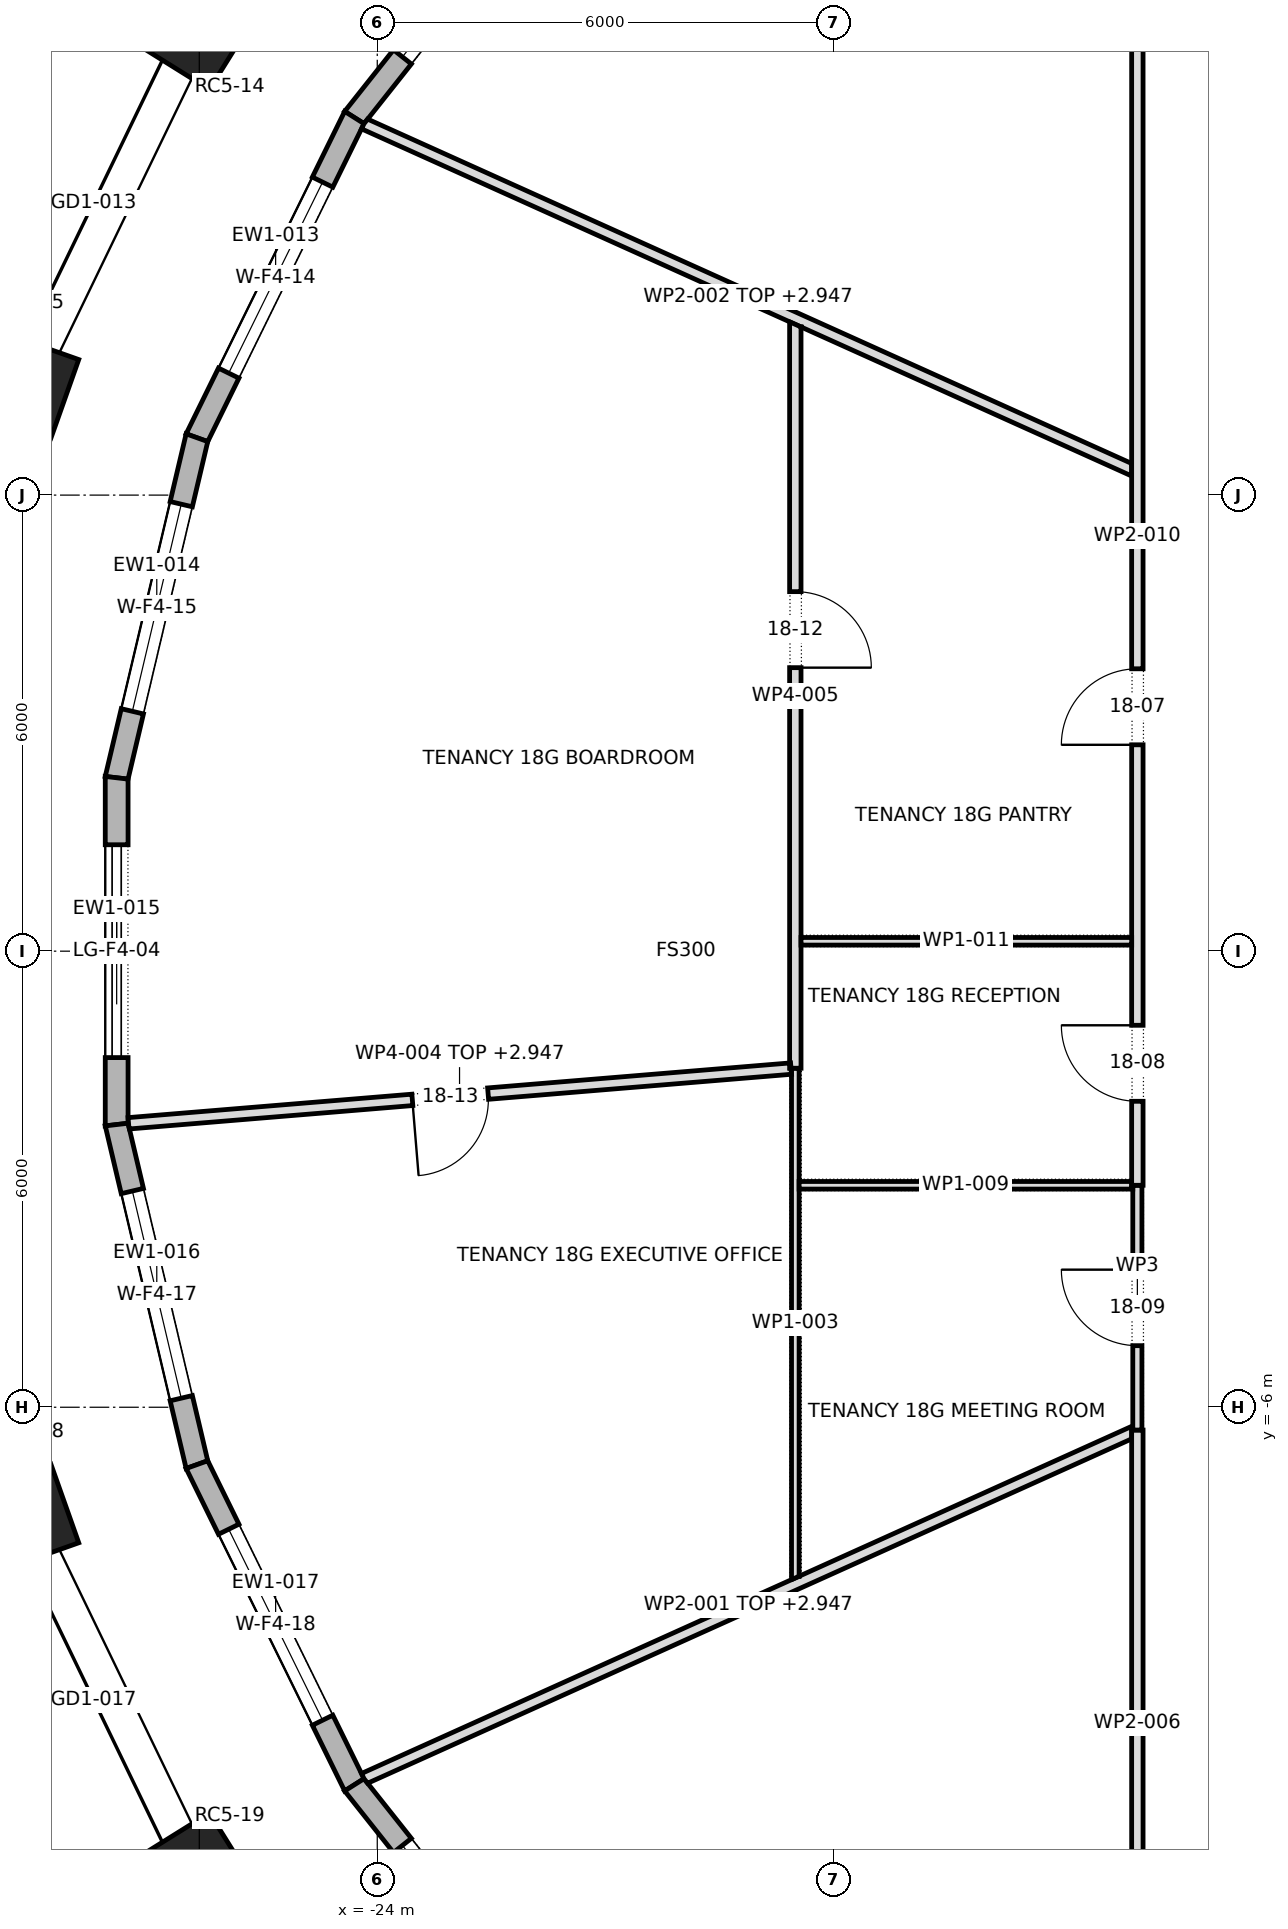
"""IFC4 building model, lengths in metres.
Left out: names, types, materials, properties, quantities, classifications, styles, units other than length and angle.
Written with IfcOpenShell. Run it as: python <this file> out.ifc"""

import sys

from ifc_helpers import new_model, si_unit, direction, frame, frame_2d, origin, origin_2d, place, context, subcontext, project, spatial, polyline, rectangle, outline, extrude, element, fill, save


model = new_model("IFC4")
c1 = context("Model", 3, precision=1e-05, world=origin(), true_north=direction((0.0, 1.0)))
c2 = subcontext(c1, "Body", "Model", "MODEL_VIEW")
j1 = project(units=[si_unit("LENGTHUNIT", "METRE"), si_unit("PLANEANGLEUNIT", "RADIAN")], contexts=[c1])
p1 = place(None, origin())
s1 = spatial("IfcSite", under=j1, at=p1, CompositionType="ELEMENT")
p2 = place(p1, origin())
s2 = spatial("IfcBuilding", under=s1, at=p2, CompositionType="ELEMENT")
p3 = place(p2, frame((0.0, 0.0, 264.3)))
s3 = spatial("IfcBuildingStorey", under=s2, at=p3, CompositionType="ELEMENT", Elevation=264.3)
for number, where, z_axis, x_axis in (
    (1, (-26.342, 12.069, 0.0), (0.0, 0.0, 1.0), (-0.529, -0.849, 0.0)),
    (2, (-28.582, 7.432, 0.0), (0.0, 0.0, 1.0), (-0.334, -0.943, 0.0)),
    (3, (-28.582, -7.432, 0.0), (0.0, 0.0, 1.0), (0.334, -0.943, 0.0)),
    (4, (-26.342, -12.069, 0.0), (0.0, 0.0, 1.0), (0.529, -0.849, 0.0)),
):
    element("IfcColumn", number, at=place(p3, frame(where, z_axis=z_axis, x_axis=x_axis)), inside=s3, PredefinedType="COLUMN", context=c2, shape_type="SweptSolid", body=[
        extrude(rectangle(XDim=1.1, YDim=1.0, at=origin_2d()), origin(), (0.0, 0.0, 1.0), 4.0),
    ])
p4 = place(p3, frame((-21.297, 14.756, 0.0), z_axis=(0.0, 0.0, 1.0), x_axis=(-0.621358373565, -0.783526497063, 0.0)))
e5 = element("IfcWall", 5, at=p4, inside=s3, PredefinedType="STANDARD", context=c2, shape_type="SweptSolid", body=[
    extrude(outline(polyline([(-0.015, -0.15), (4.852, -0.15), (4.82, 0.15), (0.015, 0.15), (-0.015, -0.15)])), origin(), (0.0, 0.0, 1.0), 3.7),
])
p5 = place(p4, frame((1.018, 0.0, 0.6)))
e6 = element("IfcOpeningElement", 6, at=p5, cuts=e5, PredefinedType="OPENING", context=c2, shape_type="SweptSolid", body=[
    extrude(rectangle(XDim=2.8, YDim=2.65, at=frame_2d((1.4, 1.325))), frame((0.0, 0.162, 0.0), z_axis=(0.0, -1.0, 0.0), x_axis=(1.0, 0.0, 0.0)), (0.0, 0.0, 1.0), 0.324),
])
p6 = place(p3, frame((-24.302, 10.967, 0.0), z_axis=(0.0, 0.0, 1.0), x_axis=(-0.441169971308, -0.89742356578, 0.0)))
e7 = element("IfcWall", 7, at=p6, inside=s3, PredefinedType="STANDARD", context=c2, shape_type="SweptSolid", body=[
    extrude(outline(polyline([(-0.016, -0.15), (4.711, -0.15), (4.677, 0.15), (0.016, 0.15), (-0.016, -0.15)])), origin(), (0.0, 0.0, 1.0), 3.7),
])
p7 = place(p6, frame((0.947, 0.0, 0.6)))
e8 = element("IfcOpeningElement", 8, at=p7, cuts=e7, PredefinedType="OPENING", context=c2, shape_type="SweptSolid", body=[
    extrude(rectangle(XDim=2.8, YDim=2.65, at=frame_2d((1.4, 1.325))), frame((0.0, 0.162, 0.0), z_axis=(0.0, -1.0, 0.0), x_axis=(1.0, 0.0, 0.0)), (0.0, 0.0, 1.0), 0.324),
])
p8 = place(p3, frame((-26.372, 6.755, 0.0), z_axis=(0.0, 0.0, 1.0), x_axis=(-0.229767529411, -0.973245540667, 0.0)))
e9 = element("IfcWall", 9, at=p8, inside=s3, PredefinedType="STANDARD", context=c2, shape_type="SweptSolid", body=[
    extrude(outline(polyline([(-0.017, -0.15), (4.614, -0.15), (4.579, 0.15), (0.017, 0.15), (-0.017, -0.15)])), origin(), (0.0, 0.0, 1.0), 3.7),
])
p9 = place(p8, frame((0.898, 0.0, 0.6)))
e10 = element("IfcOpeningElement", 10, at=p9, cuts=e9, PredefinedType="OPENING", context=c2, shape_type="SweptSolid", body=[
    extrude(rectangle(XDim=2.8, YDim=2.65, at=frame_2d((1.4, 1.325))), frame((0.0, 0.162, 0.0), z_axis=(0.0, -1.0, 0.0), x_axis=(1.0, 0.0, 0.0)), (0.0, 0.0, 1.0), 0.324),
])
p10 = place(p3, frame((-27.428, 2.281, 0.0), z_axis=(0.0, 0.0, 1.0), x_axis=(0.0, -1.0, 0.0)))
e11 = element("IfcWall", 11, at=p10, inside=s3, PredefinedType="STANDARD", context=c2, shape_type="SweptSolid", body=[
    extrude(outline(polyline([(-0.018, -0.15), (4.58, -0.15), (4.545, 0.15), (0.018, 0.15), (-0.018, -0.15)])), origin(), (0.0, 0.0, 1.0), 3.7),
])
p11 = place(p10, frame((0.881, 0.0, 0.0)))
e12 = element("IfcOpeningElement", 12, at=p11, cuts=e11, PredefinedType="OPENING", context=c2, shape_type="SweptSolid", body=[
    extrude(rectangle(XDim=2.8, YDim=3.25, at=frame_2d((1.4, 1.625))), frame((0.0, 0.162, 0.0), z_axis=(0.0, -1.0, 0.0), x_axis=(1.0, 0.0, 0.0)), (0.0, 0.0, 1.0), 0.324),
])
p12 = place(p3, frame((-27.428, -2.281, 0.0), z_axis=(0.0, 0.0, 1.0), x_axis=(0.229767529411, -0.973245540667, 0.0)))
e13 = element("IfcWall", 13, at=p12, inside=s3, PredefinedType="STANDARD", context=c2, shape_type="SweptSolid", body=[
    extrude(outline(polyline([(-0.018, -0.15), (4.614, -0.15), (4.58, 0.15), (0.018, 0.15), (-0.018, -0.15)])), origin(), (0.0, 0.0, 1.0), 3.7),
])
p13 = place(p12, frame((0.898, 0.0, 0.6)))
e14 = element("IfcOpeningElement", 14, at=p13, cuts=e13, PredefinedType="OPENING", context=c2, shape_type="SweptSolid", body=[
    extrude(rectangle(XDim=2.8, YDim=2.65, at=frame_2d((1.4, 1.325))), frame((0.0, 0.162, 0.0), z_axis=(0.0, -1.0, 0.0), x_axis=(1.0, 0.0, 0.0)), (0.0, 0.0, 1.0), 0.324),
])
p14 = place(p3, frame((-26.372, -6.755, 0.0), z_axis=(0.0, 0.0, 1.0), x_axis=(0.441169971308, -0.89742356578, 0.0)))
e15 = element("IfcWall", 15, at=p14, inside=s3, PredefinedType="STANDARD", context=c2, shape_type="SweptSolid", body=[
    extrude(outline(polyline([(-0.017, -0.15), (4.71, -0.15), (4.678, 0.15), (0.017, 0.15), (-0.017, -0.15)])), origin(), (0.0, 0.0, 1.0), 3.7),
])
p15 = place(p14, frame((0.947, 0.0, 0.6)))
e16 = element("IfcOpeningElement", 16, at=p15, cuts=e15, PredefinedType="OPENING", context=c2, shape_type="SweptSolid", body=[
    extrude(rectangle(XDim=2.8, YDim=2.65, at=frame_2d((1.4, 1.325))), frame((0.0, 0.162, 0.0), z_axis=(0.0, -1.0, 0.0), x_axis=(1.0, 0.0, 0.0)), (0.0, 0.0, 1.0), 0.324),
])
p16 = place(p3, frame((-24.302, -10.967, 0.0), z_axis=(0.0, 0.0, 1.0), x_axis=(0.621358373565, -0.783526497063, 0.0)))
e17 = element("IfcWall", 17, at=p16, inside=s3, PredefinedType="STANDARD", context=c2, shape_type="SweptSolid", body=[
    extrude(outline(polyline([(-0.016, -0.15), (4.851, -0.15), (4.821, 0.15), (0.016, 0.15), (-0.016, -0.15)])), origin(), (0.0, 0.0, 1.0), 3.7),
])
p17 = place(p16, frame((1.018, 0.0, 0.6)))
e18 = element("IfcOpeningElement", 18, at=p17, cuts=e17, PredefinedType="OPENING", context=c2, shape_type="SweptSolid", body=[
    extrude(rectangle(XDim=2.8, YDim=2.65, at=frame_2d((1.4, 1.325))), frame((0.0, 0.162, 0.0), z_axis=(0.0, -1.0, 0.0), x_axis=(1.0, 0.0, 0.0)), (0.0, 0.0, 1.0), 0.324),
])
p18 = place(p3, frame((-24.176, -10.887, 0.0), z_axis=(0.0, 0.0, 1.0), x_axis=(0.9116787738, 0.410903654648, 0.0)))
e19 = element("IfcWall", 19, at=p18, inside=s3, PredefinedType="PARTITIONING", context=c2, shape_type="SweptSolid", body=[
    extrude(outline(polyline([(0.021, -0.075), (1.858, -0.075), (3.696, -0.075), (5.533, -0.075), (7.371, -0.075), (9.208, -0.075), (11.046, -0.075), (11.094, 0.031), (11.107, 0.025), (11.13, 0.074), (11.13, 0.075), (9.525, 0.075), (7.92, 0.075), (6.315, 0.075), (6.314, 0.074), (6.312, 0.075), (4.734, 0.075), (3.156, 0.075), (1.578, 0.075), (0.0, 0.075), (0.0, 0.062), (0.002, -0.001), (0.021, -0.075)])), origin(), (0.0, 0.0, 1.0), 2.947),
])
p19 = place(p3, frame((-24.176, 10.887, 0.0), z_axis=(0.0, 0.0, 1.0), x_axis=(0.911671004153, -0.410920892857, 0.0)))
e20 = element("IfcWall", 20, at=p19, inside=s3, PredefinedType="PARTITIONING", context=c2, shape_type="SweptSolid", body=[
    extrude(outline(polyline([(0.0, -0.075), (1.584, -0.075), (3.168, -0.075), (4.752, -0.075), (6.335, -0.075), (6.341, -0.073), (6.342, -0.075), (7.933, -0.075), (9.523, -0.075), (11.113, -0.075), (11.113, -0.074), (11.097, -0.038), (11.097, -0.038), (11.046, 0.075), (9.208, 0.075), (7.371, 0.075), (5.533, 0.075), (3.696, 0.075), (1.858, 0.075), (0.021, 0.075), (0.002, 0.001), (0.0, -0.062), (0.0, -0.075)])), origin(), (0.0, 0.0, 1.0), 2.947),
])
p20 = place(p3, frame((-18.5, -8.268, 0.0), z_axis=(0.0, 0.0, 1.0), x_axis=(0.0, 1.0, 0.0)))
e21 = element("IfcWall", 21, at=p20, inside=s3, PredefinedType="PARTITIONING", context=c2, shape_type="SweptSolid", body=[
    extrude(outline(polyline([(0.045, -0.05), (1.742, -0.05), (3.44, -0.05), (5.138, -0.05), (5.138, -0.05), (5.238, -0.05), (5.238, -0.05), (6.728, -0.05), (6.728, 0.05), (5.046, 0.05), (3.364, 0.05), (1.682, 0.05), (0.0, 0.05), (0.0, 0.049), (0.045, -0.05)])), origin(), (0.0, 0.0, 1.0), 3.7),
])
p21 = place(p3, frame((-18.556, -1.545, 0.0), z_axis=(0.0, 0.0, 1.0), x_axis=(-0.996605565352, -0.0823246446, 0.0)))
e22 = element("IfcWall", 22, at=p21, inside=s3, PredefinedType="PARTITIONING", context=c2, shape_type="SweptSolid", body=[
    extrude(outline(polyline([(8.746, -0.075), (8.746, 0.039), (8.74, 0.075), (6.992, 0.075), (5.244, 0.075), (3.496, 0.075), (1.748, 0.075), (0.0, 0.075), (0.0, -0.005), (0.018, -0.006), (0.012, -0.075), (1.759, -0.075), (3.506, -0.075), (5.252, -0.075), (6.999, -0.075), (8.746, -0.075)])), origin(), (0.0, 0.0, 1.0), 2.947),
])
p22 = place(p21, frame((3.999, 0.0, 0.0)))
e23 = element("IfcOpeningElement", 23, at=p22, cuts=e22, PredefinedType="OPENING", context=c2, shape_type="SweptSolid", body=[
    extrude(rectangle(XDim=1.0, YDim=2.1, at=frame_2d((0.5, 1.05))), frame((0.0, 0.087, 0.0), z_axis=(0.0, -1.0, 0.0), x_axis=(1.0, 0.0, 0.0)), (0.0, 0.0, 1.0), 0.174),
])
p23 = place(p3, frame((-18.5, -1.54, 0.0), z_axis=(0.0, 0.0, 1.0), x_axis=(0.0, 1.0, 0.0)))
e24 = element("IfcWall", 24, at=p23, inside=s3, PredefinedType="PARTITIONING", context=c2, shape_type="SweptSolid", body=[
    extrude(outline(polyline([(0.0, -0.075), (1.95, -0.075), (3.901, -0.075), (5.851, -0.075), (7.802, -0.075), (9.752, -0.075), (9.82, 0.074), (9.82, 0.075), (7.869, 0.075), (5.919, 0.075), (3.969, 0.075), (2.019, 0.075), (0.069, 0.075), (0.07, 0.062), (0.0, 0.057), (0.0, 0.05), (0.0, 0.05), (0.0, -0.05), (0.0, -0.05), (0.0, -0.075)])), origin(), (0.0, 0.0, 1.0), 3.7),
])
p24 = place(p23, frame((5.27, 0.0, 0.0)))
e25 = element("IfcOpeningElement", 25, at=p24, cuts=e24, PredefinedType="OPENING", context=c2, shape_type="SweptSolid", body=[
    extrude(rectangle(XDim=1.0, YDim=2.1, at=frame_2d((0.5, 1.05))), frame((0.0, 0.087, 0.0), z_axis=(0.0, -1.0, 0.0), x_axis=(1.0, 0.0, 0.0)), (0.0, 0.0, 1.0), 0.174),
])
p25 = place(p3, frame((-14.0, -14.075, 0.0), z_axis=(0.0, 0.0, 1.0), x_axis=(0.0, 1.0, 0.0)))
e26 = element("IfcWall", 26, at=p25, inside=s3, PredefinedType="PARTITIONING", context=c2, shape_type="SweptSolid", body=[
    extrude(outline(polyline([(7.775, 0.075), (5.831, 0.075), (3.887, 0.075), (1.944, 0.075), (0.0, 0.075), (0.15, -0.075), (2.056, -0.075), (3.962, -0.075), (5.869, -0.075), (7.775, -0.075), (7.775, 0.075)])), origin(), (0.0, 0.0, 1.0), 3.7),
])
p26 = place(p3, frame((-14.0, -6.3, 0.0), z_axis=(0.0, 0.0, 1.0), x_axis=(0.0, 1.0, 0.0)))
e27 = element("IfcWall", 27, at=p26, inside=s3, PredefinedType="PARTITIONING", context=c2, shape_type="SweptSolid", body=[
    extrude(rectangle(XDim=3.22, YDim=0.12, at=frame_2d((1.61, 0.0))), origin(), (0.0, 0.0, 1.0), 3.7),
])
p27 = place(p26, frame((1.11, 0.0, 0.0)))
e28 = element("IfcOpeningElement", 28, at=p27, cuts=e27, PredefinedType="OPENING", context=c2, shape_type="SweptSolid", body=[
    extrude(rectangle(XDim=1.0, YDim=2.1, at=frame_2d((0.5, 1.05))), frame((0.0, 0.072, 0.0), z_axis=(0.0, -1.0, 0.0), x_axis=(1.0, 0.0, 0.0)), (0.0, 0.0, 1.0), 0.144),
])
p28 = place(p3, frame((-14.061, -3.08, 0.0), z_axis=(0.0, 0.0, 1.0), x_axis=(-1.0, 0.0, 0.0)))
e29 = element("IfcWall", 29, at=p28, inside=s3, PredefinedType="PARTITIONING", context=c2, shape_type="SweptSolid", body=[
    extrude(outline(polyline([(0.0, 0.05), (0.0, 0.0), (0.014, 0.0), (0.014, -0.05), (1.473, -0.05), (2.931, -0.05), (4.389, -0.05), (4.389, 0.05), (2.926, 0.05), (1.463, 0.05), (0.0, 0.05)])), origin(), (0.0, 0.0, 1.0), 3.7),
])
p29 = place(p3, frame((-14.0, -3.08, 0.0), z_axis=(0.0, 0.0, 1.0), x_axis=(0.0, 1.0, 0.0)))
e30 = element("IfcWall", 30, at=p29, inside=s3, PredefinedType="PARTITIONING", context=c2, shape_type="SweptSolid", body=[
    extrude(outline(polyline([(0.0, -0.075), (1.889, -0.075), (3.779, -0.075), (5.668, -0.075), (7.558, -0.075), (9.447, -0.075), (11.337, -0.075), (13.226, -0.075), (15.116, -0.075), (17.005, -0.075), (17.155, 0.075), (15.249, 0.075), (13.343, 0.075), (11.437, 0.075), (9.531, 0.075), (7.625, 0.075), (5.718, 0.075), (3.812, 0.075), (1.906, 0.075), (0.0, 0.075), (0.0, -0.075)])), origin(), (0.0, 0.0, 1.0), 3.7),
])
p30 = place(p29, frame((5.795, 0.0, 0.0)))
e31 = element("IfcOpeningElement", 31, at=p30, cuts=e30, PredefinedType="OPENING", context=c2, shape_type="SweptSolid", body=[
    extrude(rectangle(XDim=1.0, YDim=2.1, at=frame_2d((0.5, 1.05))), frame((0.0, 0.087, 0.0), z_axis=(0.0, -1.0, 0.0), x_axis=(1.0, 0.0, 0.0)), (0.0, 0.0, 1.0), 0.174),
])
p31 = place(p29, frame((1.105, 0.0, 0.0)))
e32 = element("IfcOpeningElement", 32, at=p31, cuts=e30, PredefinedType="OPENING", context=c2, shape_type="SweptSolid", body=[
    extrude(rectangle(XDim=1.0, YDim=2.1, at=frame_2d((0.5, 1.05))), frame((0.0, 0.087, 0.0), z_axis=(0.0, -1.0, 0.0), x_axis=(1.0, 0.0, 0.0)), (0.0, 0.0, 1.0), 0.174),
])
p32 = place(p3, frame((-14.075, 0.13, 0.0), z_axis=(0.0, 0.0, 1.0), x_axis=(-1.0, 0.0, 0.0)))
e33 = element("IfcWall", 33, at=p32, inside=s3, PredefinedType="PARTITIONING", context=c2, shape_type="SweptSolid", body=[
    extrude(rectangle(XDim=4.35, YDim=0.1, at=frame_2d((2.175, 0.0))), origin(), (0.0, 0.0, 1.0), 3.7),
])
p33 = place(p5, origin())
e34 = element("IfcWindow", 34, at=p33, inside=s3, PartitioningType="DOUBLE_PANEL_VERTICAL", PredefinedType="WINDOW", context=c2, shape_type="SweptSolid", body=[
    extrude(rectangle(XDim=2.8, YDim=2.65, at=frame_2d((1.4, 1.325))), frame((0.0, 0.03, 0.0), z_axis=(0.0, -1.0, 0.0), x_axis=(1.0, 0.0, 0.0)), (0.0, 0.0, 1.0), 0.06),
])
fill(e6, e34)
p34 = place(p7, origin())
e35 = element("IfcWindow", 35, at=p34, inside=s3, PartitioningType="DOUBLE_PANEL_VERTICAL", PredefinedType="WINDOW", context=c2, shape_type="SweptSolid", body=[
    extrude(rectangle(XDim=2.8, YDim=2.65, at=frame_2d((1.4, 1.325))), frame((0.0, 0.03, 0.0), z_axis=(0.0, -1.0, 0.0), x_axis=(1.0, 0.0, 0.0)), (0.0, 0.0, 1.0), 0.06),
])
fill(e8, e35)
p35 = place(p9, origin())
e36 = element("IfcWindow", 36, at=p35, inside=s3, PartitioningType="DOUBLE_PANEL_VERTICAL", PredefinedType="WINDOW", context=c2, shape_type="SweptSolid", body=[
    extrude(rectangle(XDim=2.8, YDim=2.65, at=frame_2d((1.4, 1.325))), frame((0.0, 0.03, 0.0), z_axis=(0.0, -1.0, 0.0), x_axis=(1.0, 0.0, 0.0)), (0.0, 0.0, 1.0), 0.06),
])
fill(e10, e36)
p36 = place(p11, origin())
e37 = element("IfcDoor", 37, at=p36, inside=s3, OperationType="DOUBLE_DOOR_SLIDING", PredefinedType="DOOR", context=c2, shape_type="SweptSolid", body=[
    extrude(rectangle(XDim=2.8, YDim=3.25, at=frame_2d((1.4, 1.625))), frame((0.0, 0.025, 0.0), z_axis=(0.0, -1.0, 0.0), x_axis=(1.0, 0.0, 0.0)), (0.0, 0.0, 1.0), 0.05),
])
fill(e12, e37)
p37 = place(p13, origin())
e38 = element("IfcWindow", 38, at=p37, inside=s3, PartitioningType="DOUBLE_PANEL_VERTICAL", PredefinedType="WINDOW", context=c2, shape_type="SweptSolid", body=[
    extrude(rectangle(XDim=2.8, YDim=2.65, at=frame_2d((1.4, 1.325))), frame((0.0, 0.03, 0.0), z_axis=(0.0, -1.0, 0.0), x_axis=(1.0, 0.0, 0.0)), (0.0, 0.0, 1.0), 0.06),
])
fill(e14, e38)
p38 = place(p15, origin())
e39 = element("IfcWindow", 39, at=p38, inside=s3, PartitioningType="DOUBLE_PANEL_VERTICAL", PredefinedType="WINDOW", context=c2, shape_type="SweptSolid", body=[
    extrude(rectangle(XDim=2.8, YDim=2.65, at=frame_2d((1.4, 1.325))), frame((0.0, 0.03, 0.0), z_axis=(0.0, -1.0, 0.0), x_axis=(1.0, 0.0, 0.0)), (0.0, 0.0, 1.0), 0.06),
])
fill(e16, e39)
p39 = place(p17, origin())
e40 = element("IfcWindow", 40, at=p39, inside=s3, PartitioningType="DOUBLE_PANEL_VERTICAL", PredefinedType="WINDOW", context=c2, shape_type="SweptSolid", body=[
    extrude(rectangle(XDim=2.8, YDim=2.65, at=frame_2d((1.4, 1.325))), frame((0.0, 0.03, 0.0), z_axis=(0.0, -1.0, 0.0), x_axis=(1.0, 0.0, 0.0)), (0.0, 0.0, 1.0), 0.06),
])
fill(e18, e40)
p40 = place(p30, origin())
e41 = element("IfcDoor", 41, at=p40, inside=s3, OperationType="SINGLE_SWING_RIGHT", PredefinedType="DOOR", context=c2, shape_type="SweptSolid", body=[
    extrude(rectangle(XDim=1.0, YDim=2.1, at=frame_2d((0.5, 1.05))), frame((0.0, 0.025, 0.0), z_axis=(0.0, -1.0, 0.0), x_axis=(1.0, 0.0, 0.0)), (0.0, 0.0, 1.0), 0.05),
])
fill(e31, e41)
p41 = place(p31, origin())
e42 = element("IfcDoor", 42, at=p41, inside=s3, OperationType="SINGLE_SWING_LEFT", PredefinedType="DOOR", context=c2, shape_type="SweptSolid", body=[
    extrude(rectangle(XDim=1.0, YDim=2.1, at=frame_2d((0.5, 1.05))), frame((0.0, 0.025, 0.0), z_axis=(0.0, -1.0, 0.0), x_axis=(1.0, 0.0, 0.0)), (0.0, 0.0, 1.0), 0.05),
])
fill(e32, e42)
p42 = place(p27, origin())
e43 = element("IfcDoor", 43, at=p42, inside=s3, OperationType="SINGLE_SWING_LEFT", PredefinedType="DOOR", context=c2, shape_type="SweptSolid", body=[
    extrude(rectangle(XDim=1.0, YDim=2.1, at=frame_2d((0.5, 1.05))), frame((0.0, 0.025, 0.0), z_axis=(0.0, -1.0, 0.0), x_axis=(1.0, 0.0, 0.0)), (0.0, 0.0, 1.0), 0.05),
])
fill(e28, e43)
p43 = place(p24, frame((1.0, 0.0, 0.0), z_axis=(0.0, 0.0, 1.0), x_axis=(-1.0, 0.0, 0.0)))
e44 = element("IfcDoor", 44, at=p43, inside=s3, OperationType="SINGLE_SWING_LEFT", PredefinedType="DOOR", context=c2, shape_type="SweptSolid", body=[
    extrude(rectangle(XDim=1.0, YDim=2.1, at=frame_2d((0.5, 1.05))), frame((0.0, 0.025, 0.0), z_axis=(0.0, -1.0, 0.0), x_axis=(1.0, 0.0, 0.0)), (0.0, 0.0, 1.0), 0.05),
])
fill(e25, e44)
p44 = place(p22, origin())
e45 = element("IfcDoor", 45, at=p44, inside=s3, OperationType="SINGLE_SWING_LEFT", PredefinedType="DOOR", context=c2, shape_type="SweptSolid", body=[
    extrude(rectangle(XDim=1.0, YDim=2.1, at=frame_2d((0.5, 1.05))), frame((0.0, 0.025, 0.0), z_axis=(0.0, -1.0, 0.0), x_axis=(1.0, 0.0, 0.0)), (0.0, 0.0, 1.0), 0.05),
])
fill(e23, e45)
save(model, sys.argv[1])
